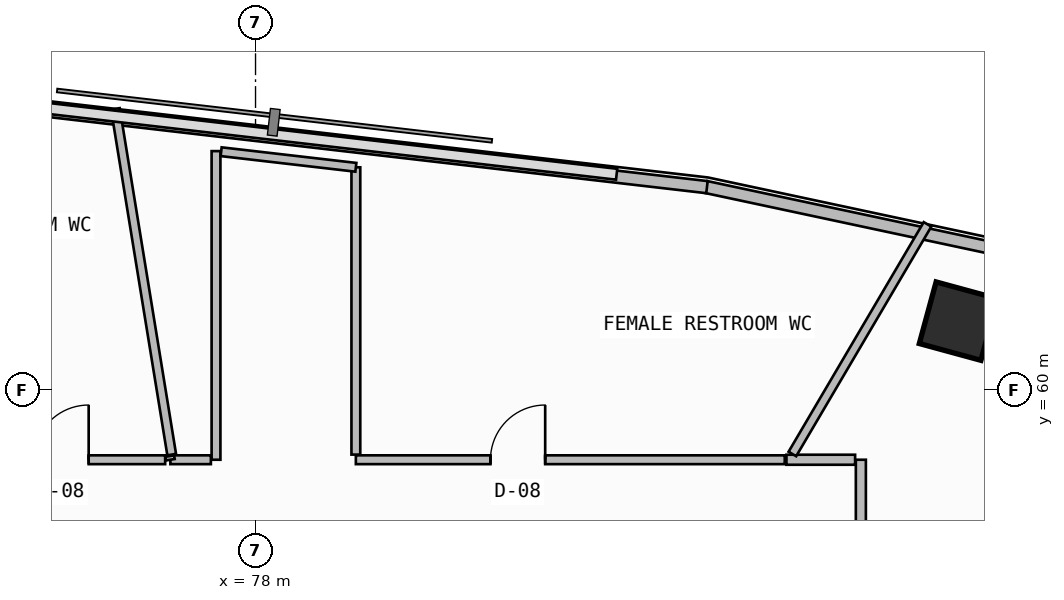
"""IFC4 building model, lengths in metres.
Left out: names, types, materials, properties, quantities, classifications, styles, units other than length and angle.
Written with IfcOpenShell. Run it as: python <this file> out.ifc"""

import sys

from ifc_helpers import new_model, si_unit, direction, frame, frame_2d, origin, origin_2d, place, context, subcontext, project, spatial, rectangle, extrude, element, fill, save


model = new_model("IFC4")
c1 = context("Model", 3, precision=1e-05, world=origin(), true_north=direction((0.0, 1.0)))
c2 = subcontext(c1, "Body", "Model", "MODEL_VIEW")
j1 = project(units=[si_unit("LENGTHUNIT", "METRE"), si_unit("PLANEANGLEUNIT", "RADIAN")], contexts=[c1])
p1 = place(None, origin())
s1 = spatial("IfcSite", under=j1, at=p1, CompositionType="ELEMENT")
p2 = place(p1, origin())
s2 = spatial("IfcBuilding", under=s1, at=p2, CompositionType="ELEMENT")
p3 = place(p2, frame((0.0, 0.0, 200.9)))
s3 = spatial("IfcBuildingStorey", under=s2, at=p3, CompositionType="ELEMENT", Elevation=200.9)
p4 = place(p3, frame((89.562, 61.135, 0.0), z_axis=(0.0, 0.0, 1.0), x_axis=(0.263031214458, 0.964787323829, 0.0)))
e1 = element("IfcColumn", 1, at=p4, inside=s3, PredefinedType="COLUMN", context=c2, shape_type="SweptSolid", body=[
    extrude(rectangle(XDim=1.05, YDim=1.05, at=origin_2d()), origin(), (0.0, 0.0, 1.0), 3.52),
])
p5 = place(p3, frame((116.396, 56.722, 0.0), z_axis=(0.0, 0.0, 1.0), x_axis=(-0.977936620644, 0.208901809478, 0.0)))
e2 = element("IfcWall", 2, at=p5, inside=s3, PredefinedType="PARAPET", context=c2, shape_type="SweptSolid", body=[
    extrude(rectangle(XDim=31.685, YDim=0.2, at=frame_2d((15.843, 0.0))), origin(), (0.0, 0.0, 1.0), 1.15),
])
p6 = place(p3, frame((85.424, 63.338, 0.0), z_axis=(0.0, 0.0, 1.0), x_axis=(-0.993364714048, 0.115006716693, 0.0)))
e3 = element("IfcWall", 3, at=p6, inside=s3, PredefinedType="PARAPET", context=c2, shape_type="SweptSolid", body=[
    extrude(rectangle(XDim=26.302, YDim=0.2, at=frame_2d((13.151, 0.0))), origin(), (0.0, 0.0, 1.0), 1.15),
])
p7 = place(p3, frame((88.021, 50.136, 0.0), z_axis=(0.0, 0.0, 1.0), x_axis=(0.893782835211, 0.448499992734, 0.0)))
e4 = element("IfcWall", 4, at=p7, inside=s3, PredefinedType="PARTITIONING", context=c2, shape_type="SweptSolid", body=[
    extrude(rectangle(XDim=20.034, YDim=0.125, at=frame_2d((10.017, 0.0))), origin(), (0.0, 0.0, 1.0), 2.645),
])
p8 = place(p3, frame((87.955, 50.163, 0.0), z_axis=(0.0, 0.0, 1.0), x_axis=(0.0, 1.0, 0.0)))
e5 = element("IfcWall", 5, at=p8, inside=s3, PredefinedType="PARTITIONING", context=c2, shape_type="SweptSolid", body=[
    extrude(rectangle(XDim=8.693, YDim=0.165, at=frame_2d((4.346, 0.0))), origin(), (0.0, 0.0, 1.0), 2.745),
])
p9 = place(p8, frame((2.752, 0.0, 0.0)))
e6 = element("IfcOpeningElement", 6, at=p9, cuts=e5, PredefinedType="OPENING", context=c2, shape_type="SweptSolid", body=[
    extrude(rectangle(XDim=1.0, YDim=2.2, at=frame_2d((0.5, 1.1))), frame((0.0, 0.093, 0.0), z_axis=(0.0, -1.0, 0.0), x_axis=(1.0, 0.0, 0.0)), (0.0, 0.0, 1.0), 0.185),
])
p10 = place(p3, frame((87.861, 58.855, 0.0), z_axis=(0.0, 0.0, 1.0), x_axis=(-1.0, 0.0, 0.0)))
e7 = element("IfcWall", 7, at=p10, inside=s3, PredefinedType="PARTITIONING", context=c2, shape_type="SweptSolid", body=[
    extrude(rectangle(XDim=1.129, YDim=0.165, at=frame_2d((0.565, 0.0))), origin(), (0.0, 0.0, 1.0), 2.745),
])
p11 = place(p3, frame((86.829, 58.95, 0.0), z_axis=(0.0, 0.0, 1.0), x_axis=(0.507234379444, 0.861808148203, 0.0)))
e8 = element("IfcWall", 8, at=p11, inside=s3, PredefinedType="PARTITIONING", context=c2, shape_type="SweptSolid", body=[
    extrude(rectangle(XDim=4.382, YDim=0.145, at=frame_2d((2.191, 0.0))), origin(), (0.0, 0.0, 1.0), 3.26),
])
p12 = place(p3, frame((86.704, 58.855, 0.0), z_axis=(0.0, 0.0, 1.0), x_axis=(-1.0, 0.0, 0.0)))
e9 = element("IfcWall", 9, at=p12, inside=s3, PredefinedType="PARTITIONING", context=c2, shape_type="SweptSolid", body=[
    extrude(rectangle(XDim=7.054, YDim=0.145, at=frame_2d((3.527, 0.0))), origin(), (0.0, 0.0, 1.0), 3.26),
])
p13 = place(p12, frame((3.94, 0.0, 0.0)))
e10 = element("IfcOpeningElement", 10, at=p13, cuts=e9, PredefinedType="OPENING", context=c2, shape_type="SweptSolid", body=[
    extrude(rectangle(XDim=0.9, YDim=2.1, at=frame_2d((0.45, 1.05))), frame((0.0, 0.083, 0.0), z_axis=(0.0, -1.0, 0.0), x_axis=(1.0, 0.0, 0.0)), (0.0, 0.0, 1.0), 0.165),
])
p14 = place(p3, frame((77.35, 63.931, 0.0), z_axis=(0.0, 0.0, 1.0), x_axis=(0.0, -1.0, 0.0)))
e11 = element("IfcWall", 11, at=p14, inside=s3, PredefinedType="PARTITIONING", context=c2, shape_type="SweptSolid", body=[
    extrude(rectangle(XDim=5.075, YDim=0.145, at=frame_2d((2.538, 0.0))), origin(), (0.0, 0.0, 1.0), 3.26),
])
p15 = place(p3, frame((79.65, 58.94, 0.0), z_axis=(0.0, 0.0, 1.0), x_axis=(0.0, 1.0, 0.0)))
e12 = element("IfcWall", 12, at=p15, inside=s3, PredefinedType="PARTITIONING", context=c2, shape_type="SweptSolid", body=[
    extrude(rectangle(XDim=4.725, YDim=0.145, at=frame_2d((2.362, 0.0))), origin(), (0.0, 0.0, 1.0), 3.26),
])
p16 = place(p3, frame((79.65, 63.665, 0.0), z_axis=(0.0, 0.0, 1.0), x_axis=(-0.993371485876, 0.11494821029, 0.0)))
e13 = element("IfcWall", 13, at=p16, inside=s3, PredefinedType="PARTITIONING", context=c2, shape_type="SweptSolid", body=[
    extrude(rectangle(XDim=2.23, YDim=0.145, at=frame_2d((1.115, 0.0))), origin(), (0.0, 0.0, 1.0), 3.26),
])
p17 = place(p3, frame((77.265, 58.855, 0.0), z_axis=(0.0, 0.0, 1.0), x_axis=(-1.0, 0.0, 0.0)))
e14 = element("IfcWall", 14, at=p17, inside=s3, PredefinedType="PARTITIONING", context=c2, shape_type="SweptSolid", body=[
    extrude(rectangle(XDim=0.666, YDim=0.145, at=frame_2d((0.333, 0.0))), origin(), (0.0, 0.0, 1.0), 3.26),
])
p18 = place(p3, frame((76.599, 58.855, 0.0), z_axis=(0.0, 0.0, 1.0), x_axis=(-0.165051759845, 0.98628490639, 0.0)))
e15 = element("IfcWall", 15, at=p18, inside=s3, PredefinedType="PARTITIONING", context=c2, shape_type="SweptSolid", body=[
    extrude(rectangle(XDim=0.061, YDim=0.145, at=frame_2d((0.03, 0.0))), origin(), (0.0, 0.0, 1.0), 3.26),
])
p19 = place(p3, frame((76.621, 58.94, 0.0), z_axis=(0.0, 0.0, 1.0), x_axis=(-0.160748572613, 0.986995388238, 0.0)))
e16 = element("IfcWall", 16, at=p19, inside=s3, PredefinedType="PARTITIONING", context=c2, shape_type="SweptSolid", body=[
    extrude(rectangle(XDim=5.761, YDim=0.145, at=frame_2d((2.88, 0.0))), origin(), (0.0, 0.0, 1.0), 3.26),
])
p20 = place(p3, frame((76.514, 58.855, 0.0), z_axis=(0.0, 0.0, 1.0), x_axis=(-1.0, 0.0, 0.0)))
e17 = element("IfcWall", 17, at=p20, inside=s3, PredefinedType="PARTITIONING", context=c2, shape_type="SweptSolid", body=[
    extrude(rectangle(XDim=3.416, YDim=0.145, at=frame_2d((1.708, 0.0))), origin(), (0.0, 0.0, 1.0), 3.26),
])
p21 = place(p20, frame((1.258, 0.0, 0.0)))
e18 = element("IfcOpeningElement", 18, at=p21, cuts=e17, PredefinedType="OPENING", context=c2, shape_type="SweptSolid", body=[
    extrude(rectangle(XDim=0.9, YDim=2.1, at=frame_2d((0.45, 1.05))), frame((0.0, 0.083, 0.0), z_axis=(0.0, -1.0, 0.0), x_axis=(1.0, 0.0, 0.0)), (0.0, 0.0, 1.0), 0.165),
])
p22 = place(p13, frame((0.9, 0.0, 0.0), z_axis=(0.0, 0.0, 1.0), x_axis=(-1.0, 0.0, 0.0)))
e19 = element("IfcDoor", 19, at=p22, inside=s3, OperationType="SINGLE_SWING_RIGHT", PredefinedType="DOOR", context=c2, shape_type="SweptSolid", body=[
    extrude(rectangle(XDim=0.9, YDim=2.1, at=frame_2d((0.45, 1.05))), frame((0.0, 0.025, 0.0), z_axis=(0.0, -1.0, 0.0), x_axis=(1.0, 0.0, 0.0)), (0.0, 0.0, 1.0), 0.05),
])
fill(e10, e19)
p23 = place(p21, frame((0.9, 0.0, 0.0), z_axis=(0.0, 0.0, 1.0), x_axis=(-1.0, 0.0, 0.0)))
e20 = element("IfcDoor", 20, at=p23, inside=s3, OperationType="SINGLE_SWING_RIGHT", PredefinedType="DOOR", context=c2, shape_type="SweptSolid", body=[
    extrude(rectangle(XDim=0.9, YDim=2.1, at=frame_2d((0.45, 1.05))), frame((0.0, 0.025, 0.0), z_axis=(0.0, -1.0, 0.0), x_axis=(1.0, 0.0, 0.0)), (0.0, 0.0, 1.0), 0.05),
])
fill(e18, e20)
save(model, sys.argv[1])
